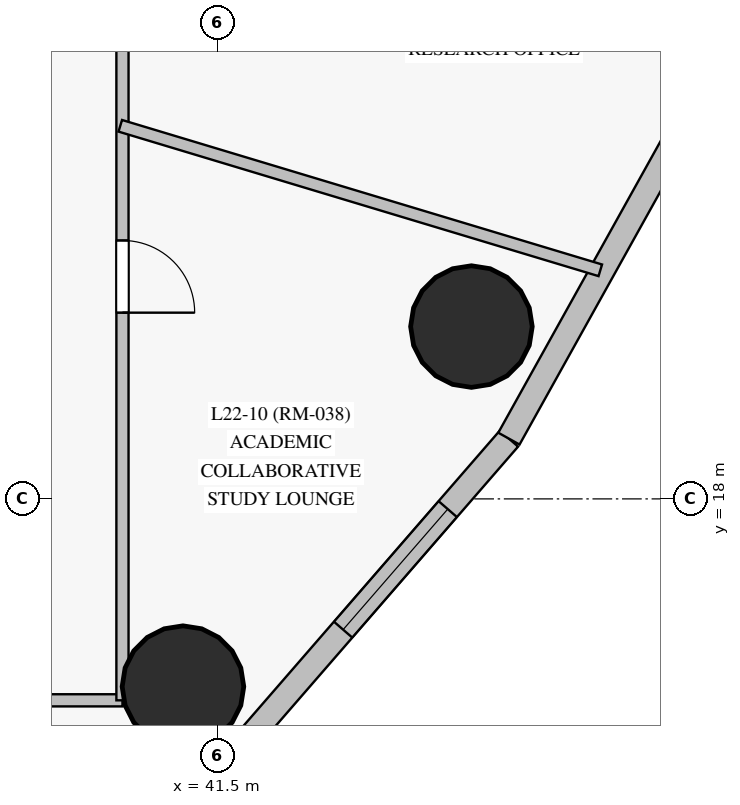
"""IFC4 building model, lengths in metres.
Left out: names, types, materials, properties, quantities, classifications, styles, units other than length and angle.
Written with IfcOpenShell. Run it as: python <this file> out.ifc"""

import sys

from ifc_helpers import new_model, si_unit, direction, frame, frame_2d, origin, origin_with_axes, origin_2d, place, context, subcontext, project, spatial, rectangle, circle, extrude, source, transform, mapped, element, fill, save


model = new_model("IFC4")
c1 = context("Model", 3, precision=1e-05, world=origin(), true_north=direction((0.0, 1.0)))
c2 = subcontext(c1, "Body", "Model", "MODEL_VIEW")
j1 = project(units=[si_unit("LENGTHUNIT", "METRE"), si_unit("PLANEANGLEUNIT", "RADIAN")], contexts=[c1])
p1 = place(None, origin())
s1 = spatial("IfcSite", under=j1, at=p1, CompositionType="ELEMENT")
p2 = place(p1, origin())
s2 = spatial("IfcBuilding", under=s1, at=p2, CompositionType="ELEMENT")
p3 = place(p2, frame((0.0, 0.0, 84.1)))
s3 = spatial("IfcBuildingStorey", under=s2, at=p3, CompositionType="ELEMENT", Elevation=84.1)
m1 = source(origin_with_axes(), c2, "Body", "SweptSolid", [
    extrude(circle(Radius=0.8, at=origin_2d()), origin(), (0.0, 0.0, 1.0), 3.6),
])
for number, where, z_axis, x_axis in (
    (1, (44.841, 20.267, 0.0), (0.0, 0.0, 1.0), (1.0, 0.0, 0.0)),
    (2, (41.046, 15.53, 0.0), (0.0, 0.0, 1.0), (1.0, 0.0, 0.0)),
):
    element("IfcColumn", number, at=place(p3, frame(where, z_axis=z_axis, x_axis=x_axis)), inside=s3, PredefinedType="COLUMN", context=c2, shape_type="MappedRepresentation", body=[
        mapped(m1, transform((0.0, 0.0, 0.0), scale=1.0)),
    ])
p4 = place(p3, frame((38.497, 10.916, 0.0), z_axis=(0.0, 0.0, 1.0), x_axis=(0.655526512459, 0.755172160148, 0.0)))
e3 = element("IfcWall", 3, at=p4, inside=s3, PredefinedType="SOLIDWALL", context=c2, shape_type="SweptSolid", body=[
    extrude(rectangle(XDim=10.43, YDim=0.32, at=frame_2d((5.215, 0.0))), origin(), (0.0, 0.0, 1.0), 3.325),
])
p5 = place(p4, frame((1.167, 0.0, 0.85)))
e4 = element("IfcOpeningElement", 4, at=p5, cuts=e3, PredefinedType="OPENING", context=c2, shape_type="SweptSolid", body=[
    extrude(rectangle(XDim=2.1, YDim=1.95, at=frame_2d((1.05, 0.975))), frame((0.0, 0.17, 0.0), z_axis=(0.0, -1.0, 0.0), x_axis=(1.0, 0.0, 0.0)), (0.0, 0.0, 1.0), 0.34),
])
p6 = place(p4, frame((7.103, 0.0, 0.85)))
e5 = element("IfcOpeningElement", 5, at=p6, cuts=e3, PredefinedType="OPENING", context=c2, shape_type="SweptSolid", body=[
    extrude(rectangle(XDim=2.1, YDim=1.95, at=frame_2d((1.05, 0.975))), frame((0.0, 0.17, 0.0), z_axis=(0.0, -1.0, 0.0), x_axis=(1.0, 0.0, 0.0)), (0.0, 0.0, 1.0), 0.34),
])
p7 = place(p3, frame((45.334, 18.793, 0.0), z_axis=(0.0, 0.0, 1.0), x_axis=(0.486333635772, 0.873773194094, 0.0)))
e6 = element("IfcWall", 6, at=p7, inside=s3, PredefinedType="SOLIDWALL", context=c2, shape_type="SweptSolid", body=[
    extrude(rectangle(XDim=15.002, YDim=0.32, at=frame_2d((7.501, 0.0))), origin(), (0.0, 0.0, 1.0), 3.325),
])
p8 = place(p7, frame((4.893, 0.0, 0.85)))
e7 = element("IfcOpeningElement", 7, at=p8, cuts=e6, PredefinedType="OPENING", context=c2, shape_type="SweptSolid", body=[
    extrude(rectangle(XDim=2.1, YDim=1.95, at=frame_2d((1.05, 0.975))), frame((0.0, 0.17, 0.0), z_axis=(0.0, -1.0, 0.0), x_axis=(1.0, 0.0, 0.0)), (0.0, 0.0, 1.0), 0.34),
])
p9 = place(p7, frame((10.246, 0.0, 0.85)))
e8 = element("IfcOpeningElement", 8, at=p9, cuts=e6, PredefinedType="OPENING", context=c2, shape_type="SweptSolid", body=[
    extrude(rectangle(XDim=2.1, YDim=1.95, at=frame_2d((1.05, 0.975))), frame((0.0, 0.17, 0.0), z_axis=(0.0, -1.0, 0.0), x_axis=(1.0, 0.0, 0.0)), (0.0, 0.0, 1.0), 0.34),
])
p10 = place(p3, frame((40.25, 15.35, 0.0), z_axis=(0.0, 0.0, 1.0), x_axis=(-1.0, 0.0, 0.0)))
e9 = element("IfcWall", 9, at=p10, inside=s3, PredefinedType="PARTITIONING", context=c2, shape_type="SweptSolid", body=[
    extrude(rectangle(XDim=29.75, YDim=0.16, at=frame_2d((14.875, 0.0))), origin(), (0.0, 0.0, 1.0), 2.675),
])
p11 = place(p10, frame((25.988, 0.0, 0.0)))
e10 = element("IfcOpeningElement", 10, at=p11, cuts=e9, PredefinedType="OPENING", context=c2, shape_type="SweptSolid", body=[
    extrude(rectangle(XDim=0.96, YDim=2.15, at=frame_2d((0.48, 1.075))), frame((0.0, 0.09, 0.0), z_axis=(0.0, -1.0, 0.0), x_axis=(1.0, 0.0, 0.0)), (0.0, 0.0, 1.0), 0.18),
])
p12 = place(p10, frame((21.798, 0.0, 0.0)))
e11 = element("IfcOpeningElement", 11, at=p12, cuts=e9, PredefinedType="OPENING", context=c2, shape_type="SweptSolid", body=[
    extrude(rectangle(XDim=0.95, YDim=2.15, at=frame_2d((0.475, 1.075))), frame((0.0, 0.09, 0.0), z_axis=(0.0, -1.0, 0.0), x_axis=(1.0, 0.0, 0.0)), (0.0, 0.0, 1.0), 0.18),
])
p13 = place(p10, frame((18.272, 0.0, 0.0)))
e12 = element("IfcOpeningElement", 12, at=p13, cuts=e9, PredefinedType="OPENING", context=c2, shape_type="SweptSolid", body=[
    extrude(rectangle(XDim=0.95, YDim=2.15, at=frame_2d((0.475, 1.075))), frame((0.0, 0.09, 0.0), z_axis=(0.0, -1.0, 0.0), x_axis=(1.0, 0.0, 0.0)), (0.0, 0.0, 1.0), 0.18),
])
p14 = place(p10, frame((15.977, 0.0, 0.0)))
e13 = element("IfcOpeningElement", 13, at=p14, cuts=e9, PredefinedType="OPENING", context=c2, shape_type="SweptSolid", body=[
    extrude(rectangle(XDim=0.95, YDim=2.15, at=frame_2d((0.475, 1.075))), frame((0.0, 0.09, 0.0), z_axis=(0.0, -1.0, 0.0), x_axis=(1.0, 0.0, 0.0)), (0.0, 0.0, 1.0), 0.18),
])
p15 = place(p10, frame((14.21, 0.0, 0.0)))
e14 = element("IfcOpeningElement", 14, at=p15, cuts=e9, PredefinedType="OPENING", context=c2, shape_type="SweptSolid", body=[
    extrude(rectangle(XDim=0.95, YDim=2.15, at=frame_2d((0.475, 1.075))), frame((0.0, 0.09, 0.0), z_axis=(0.0, -1.0, 0.0), x_axis=(1.0, 0.0, 0.0)), (0.0, 0.0, 1.0), 0.18),
])
p16 = place(p10, frame((9.938, 0.0, 0.0)))
e15 = element("IfcOpeningElement", 15, at=p16, cuts=e9, PredefinedType="OPENING", context=c2, shape_type="SweptSolid", body=[
    extrude(rectangle(XDim=0.95, YDim=2.15, at=frame_2d((0.475, 1.075))), frame((0.0, 0.09, 0.0), z_axis=(0.0, -1.0, 0.0), x_axis=(1.0, 0.0, 0.0)), (0.0, 0.0, 1.0), 0.18),
])
p17 = place(p10, frame((6.962, 0.0, 0.0)))
e16 = element("IfcOpeningElement", 16, at=p17, cuts=e9, PredefinedType="OPENING", context=c2, shape_type="SweptSolid", body=[
    extrude(rectangle(XDim=0.95, YDim=2.15, at=frame_2d((0.475, 1.075))), frame((0.0, 0.09, 0.0), z_axis=(0.0, -1.0, 0.0), x_axis=(1.0, 0.0, 0.0)), (0.0, 0.0, 1.0), 0.18),
])
p18 = place(p3, frame((40.25, 37.65, 0.0), z_axis=(0.0, 0.0, 1.0), x_axis=(0.0, -1.0, 0.0)))
e17 = element("IfcWall", 17, at=p18, inside=s3, PredefinedType="PARTITIONING", context=c2, shape_type="SweptSolid", body=[
    extrude(rectangle(XDim=22.3, YDim=0.16, at=frame_2d((11.15, 0.0))), origin(), (0.0, 0.0, 1.0), 2.725),
])
p19 = place(p18, frame((16.25, 0.0, 0.0)))
e18 = element("IfcOpeningElement", 18, at=p19, cuts=e17, PredefinedType="OPENING", context=c2, shape_type="SweptSolid", body=[
    extrude(rectangle(XDim=0.95, YDim=2.15, at=frame_2d((0.475, 1.075))), frame((0.0, 0.09, 0.0), z_axis=(0.0, -1.0, 0.0), x_axis=(1.0, 0.0, 0.0)), (0.0, 0.0, 1.0), 0.18),
])
p20 = place(p18, frame((11.165, 0.0, 0.0)))
e19 = element("IfcOpeningElement", 19, at=p20, cuts=e17, PredefinedType="OPENING", context=c2, shape_type="SweptSolid", body=[
    extrude(rectangle(XDim=0.95, YDim=2.15, at=frame_2d((0.475, 1.075))), frame((0.0, 0.09, 0.0), z_axis=(0.0, -1.0, 0.0), x_axis=(1.0, 0.0, 0.0)), (0.0, 0.0, 1.0), 0.18),
])
p21 = place(p18, frame((9.513, 0.0, 0.0)))
e20 = element("IfcOpeningElement", 20, at=p21, cuts=e17, PredefinedType="OPENING", context=c2, shape_type="SweptSolid", body=[
    extrude(rectangle(XDim=0.95, YDim=2.15, at=frame_2d((0.475, 1.075))), frame((0.0, 0.09, 0.0), z_axis=(0.0, -1.0, 0.0), x_axis=(1.0, 0.0, 0.0)), (0.0, 0.0, 1.0), 0.18),
])
p22 = place(p18, frame((6.94, 0.0, 0.0)))
e21 = element("IfcOpeningElement", 21, at=p22, cuts=e17, PredefinedType="OPENING", context=c2, shape_type="SweptSolid", body=[
    extrude(rectangle(XDim=0.95, YDim=2.15, at=frame_2d((0.475, 1.075))), frame((0.0, 0.09, 0.0), z_axis=(0.0, -1.0, 0.0), x_axis=(1.0, 0.0, 0.0)), (0.0, 0.0, 1.0), 0.18),
])
p23 = place(p18, frame((3.677, 0.0, 0.0)))
e22 = element("IfcOpeningElement", 22, at=p23, cuts=e17, PredefinedType="OPENING", context=c2, shape_type="SweptSolid", body=[
    extrude(rectangle(XDim=0.95, YDim=2.15, at=frame_2d((0.475, 1.075))), frame((0.0, 0.09, 0.0), z_axis=(0.0, -1.0, 0.0), x_axis=(1.0, 0.0, 0.0)), (0.0, 0.0, 1.0), 0.18),
])
p24 = place(p18, frame((0.862, 0.0, 0.0)))
e23 = element("IfcOpeningElement", 23, at=p24, cuts=e17, PredefinedType="OPENING", context=c2, shape_type="SweptSolid", body=[
    extrude(rectangle(XDim=0.95, YDim=2.15, at=frame_2d((0.475, 1.075))), frame((0.0, 0.09, 0.0), z_axis=(0.0, -1.0, 0.0), x_axis=(1.0, 0.0, 0.0)), (0.0, 0.0, 1.0), 0.18),
])
p25 = place(p3, frame((40.221, 22.908, 0.0), z_axis=(0.0, 0.0, 1.0), x_axis=(0.957544636521, -0.288285048292, 0.0)))
e24 = element("IfcWall", 24, at=p25, inside=s3, PredefinedType="PARTITIONING", context=c2, shape_type="SweptSolid", body=[
    extrude(rectangle(XDim=6.595, YDim=0.16, at=frame_2d((3.298, 0.0))), origin(), (0.0, 0.0, 1.0), 3.325),
])
m2 = source(origin_with_axes(), c2, "Body", "SweptSolid", [
    extrude(rectangle(XDim=2.1, YDim=1.95, at=frame_2d((1.05, 0.975))), frame((0.0, 0.03, 0.0), z_axis=(0.0, -1.0, 0.0), x_axis=(1.0, 0.0, 0.0)), (0.0, 0.0, 1.0), 0.06),
])
p26 = place(p6, origin())
e25 = element("IfcWindow", 25, at=p26, inside=s3, PartitioningType="SINGLE_PANEL", PredefinedType="WINDOW", context=c2, shape_type="MappedRepresentation", body=[
    mapped(m2, transform((0.0, 0.0, 0.0), scale=1.0)),
])
fill(e5, e25)
m3 = source(origin_with_axes(), c2, "Body", "SweptSolid", [
    extrude(rectangle(XDim=0.95, YDim=2.15, at=frame_2d((0.475, 1.075))), frame((0.0, 0.025, 0.0), z_axis=(0.0, -1.0, 0.0), x_axis=(1.0, 0.0, 0.0)), (0.0, 0.0, 1.0), 0.05),
])
p27 = place(p19, origin())
e26 = element("IfcDoor", 26, at=p27, inside=s3, OperationType="SINGLE_SWING_RIGHT", PredefinedType="DOOR", context=c2, shape_type="MappedRepresentation", body=[
    mapped(m3, transform((0.0, 0.0, 0.0), scale=1.0)),
])
fill(e18, e26)
save(model, sys.argv[1])
